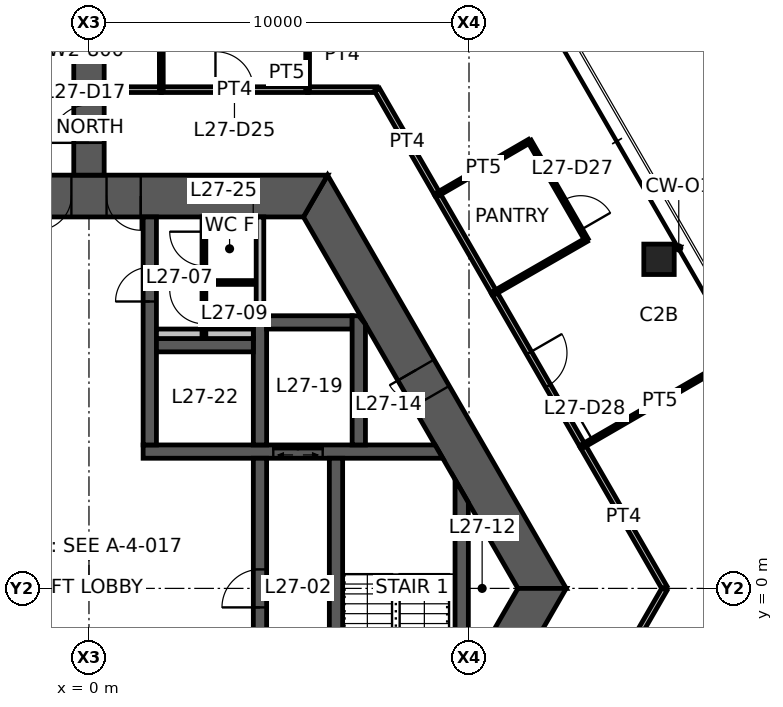
"""IFC4 building model, lengths in metres.
Left out: names, types, materials, properties, quantities, classifications, styles, units other than length and angle.
Written with IfcOpenShell. Run it as: python <this file> out.ifc"""

import sys

from ifc_helpers import new_model, si_unit, direction, frame, frame_2d, origin, origin_2d, place, context, subcontext, project, spatial, polyline, rectangle, hollow_rectangle, outline, extrude, element, fill, save


model = new_model("IFC4")
c1 = context("Model", 3, precision=1e-05, world=origin(), true_north=direction((0.0, 1.0)))
c2 = subcontext(c1, "Body", "Model", "MODEL_VIEW")
j1 = project(units=[si_unit("LENGTHUNIT", "METRE"), si_unit("PLANEANGLEUNIT", "RADIAN")], contexts=[c1])
p1 = place(None, origin())
s1 = spatial("IfcSite", under=j1, at=p1, CompositionType="ELEMENT")
p2 = place(p1, origin())
s2 = spatial("IfcBuilding", under=s1, at=p2, CompositionType="ELEMENT")
p3 = place(p2, frame((0.0, 0.0, 108.0)))
s3 = spatial("IfcBuildingStorey", under=s2, at=p3, CompositionType="ELEMENT", Elevation=108.0)
p4 = place(p3, frame((15.0, 8.66, 0.0), z_axis=(0.0, 0.0, 1.0), x_axis=(1.0, 0.0, 0.0)))
e1 = element("IfcColumn", 1, at=p4, inside=s3, PredefinedType="COLUMN", context=c2, shape_type="SweptSolid", body=[
    extrude(hollow_rectangle(XDim=0.8, YDim=0.8, WallThickness=0.045, at=origin_2d()), origin(), (0.0, 0.0, 1.0), 3.9),
])
p5 = place(p3, frame((11.922, 0.0, 0.0), z_axis=(0.0, 0.0, 1.0), x_axis=(-0.500004296715, 0.866022923061, 0.0)))
e2 = element("IfcWall", 2, at=p5, inside=s3, PredefinedType="SHEAR", context=c2, shape_type="SweptSolid", body=[
    extrude(outline(polyline([(-0.318, -0.55), (5.835, -0.55), (6.635, -0.55), (12.24, -0.55), (11.605, 0.55), (6.635, 0.55), (5.835, 0.55), (0.318, 0.55), (-0.318, -0.55)])), origin(), (0.0, 0.0, 1.0), 3.9),
])
p6 = place(p5, frame((5.835, 0.0, 0.0)))
e3 = element("IfcOpeningElement", 3, at=p6, cuts=e2, PredefinedType="OPENING", context=c2, shape_type="SweptSolid", body=[
    extrude(rectangle(XDim=0.8, YDim=2.1, at=frame_2d((0.4, 1.05))), frame((0.0, 0.56, 0.0), z_axis=(0.0, -1.0, 0.0), x_axis=(1.0, 0.0, 0.0)), (0.0, 0.0, 1.0), 1.12),
])
p7 = place(p3, frame((5.961, 10.325, 0.0), z_axis=(0.0, 0.0, 1.0), x_axis=(-1.0, 0.0, 0.0)))
e4 = element("IfcWall", 4, at=p7, inside=s3, PredefinedType="SHEAR", context=c2, shape_type="SweptSolid", body=[
    extrude(outline(polyline([(-0.318, -0.55), (4.599, -0.55), (5.499, -0.55), (6.424, -0.55), (7.323, -0.55), (12.24, -0.55), (11.605, 0.55), (7.323, 0.55), (6.424, 0.55), (5.499, 0.55), (4.599, 0.55), (0.318, 0.55), (-0.318, -0.55)])), origin(), (0.0, 0.0, 1.0), 3.9),
])
p8 = place(p7, frame((6.424, 0.0, 0.0)))
e5 = element("IfcOpeningElement", 5, at=p8, cuts=e4, PredefinedType="OPENING", context=c2, shape_type="SweptSolid", body=[
    extrude(rectangle(XDim=0.9, YDim=2.1, at=frame_2d((0.45, 1.05))), frame((0.0, 0.56, 0.0), z_axis=(0.0, -1.0, 0.0), x_axis=(1.0, 0.0, 0.0)), (0.0, 0.0, 1.0), 1.12),
])
p9 = place(p7, frame((4.599, 0.0, 0.0)))
e6 = element("IfcOpeningElement", 6, at=p9, cuts=e4, PredefinedType="OPENING", context=c2, shape_type="SweptSolid", body=[
    extrude(rectangle(XDim=0.9, YDim=2.1, at=frame_2d((0.45, 1.05))), frame((0.0, 0.56, 0.0), z_axis=(0.0, -1.0, 0.0), x_axis=(1.0, 0.0, 0.0)), (0.0, 0.0, 1.0), 1.12),
])
p10 = place(p3, frame((5.961, -10.325, 0.0), z_axis=(0.0, 0.0, 1.0), x_axis=(0.500004296715, 0.866022923061, 0.0)))
e7 = element("IfcWall", 7, at=p10, inside=s3, PredefinedType="SHEAR", context=c2, shape_type="SweptSolid", body=[
    extrude(outline(polyline([(-0.318, -0.55), (4.594, -0.55), (5.394, -0.55), (12.24, -0.55), (11.605, 0.55), (5.394, 0.55), (4.594, 0.55), (0.318, 0.55), (-0.318, -0.55)])), origin(), (0.0, 0.0, 1.0), 3.9),
])
p11 = place(p10, frame((4.594, 0.0, 0.0)))
e8 = element("IfcOpeningElement", 8, at=p11, cuts=e7, PredefinedType="OPENING", context=c2, shape_type="SweptSolid", body=[
    extrude(rectangle(XDim=0.8, YDim=2.1, at=frame_2d((0.4, 1.05))), frame((0.0, 0.56, 0.0), z_axis=(0.0, -1.0, 0.0), x_axis=(1.0, 0.0, 0.0)), (0.0, 0.0, 1.0), 1.12),
])
p12 = place(p3, frame((0.0, 10.875, 0.0), z_axis=(0.0, 0.0, 1.0), x_axis=(0.0, 1.0, 0.0)))
e9 = element("IfcWall", 9, at=p12, inside=s3, PredefinedType="SHEAR", context=c2, shape_type="SweptSolid", body=[
    extrude(rectangle(XDim=7.646, YDim=0.8, at=frame_2d((3.823, 0.0))), origin(), (0.0, 0.0, 1.0), 3.9),
])
p13 = place(p12, frame((0.85, 0.0, 0.0)))
e10 = element("IfcOpeningElement", 10, at=p13, cuts=e9, PredefinedType="OPENING", context=c2, shape_type="SweptSolid", body=[
    extrude(rectangle(XDim=1.0, YDim=2.1, at=frame_2d((0.5, 1.05))), frame((0.0, 0.41, 0.0), z_axis=(0.0, -1.0, 0.0), x_axis=(1.0, 0.0, 0.0)), (0.0, 0.0, 1.0), 0.82),
])
p14 = place(p3, frame((1.425, 3.6, 0.0), z_axis=(0.0, 0.0, 1.0), x_axis=(1.0, 0.0, 0.0)))
e11 = element("IfcWall", 11, at=p14, inside=s3, PredefinedType="SHEAR", context=c2, shape_type="SweptSolid", body=[
    extrude(outline(polyline([(0.0, -0.175), (3.425, -0.175), (4.725, -0.175), (7.885, -0.175), (7.683, 0.175), (4.725, 0.175), (3.425, 0.175), (0.0, 0.175), (0.0, -0.175)])), origin(), (0.0, 0.0, 1.0), 3.9),
])
p15 = place(p14, frame((3.425, 0.0, 0.0)))
e12 = element("IfcOpeningElement", 12, at=p15, cuts=e11, PredefinedType="OPENING", context=c2, shape_type="SweptSolid", body=[
    extrude(rectangle(XDim=1.3, YDim=2.1, at=frame_2d((0.65, 1.05))), frame((0.0, 0.185, 0.0), z_axis=(0.0, -1.0, 0.0), x_axis=(1.0, 0.0, 0.0)), (0.0, 0.0, 1.0), 0.37),
])
p16 = place(p3, frame((1.6, 3.775, 0.0), z_axis=(0.0, 0.0, 1.0), x_axis=(0.0, 1.0, 0.0)))
e13 = element("IfcWall", 13, at=p16, inside=s3, PredefinedType="SHEAR", context=c2, shape_type="SweptSolid", body=[
    extrude(rectangle(XDim=6.0, YDim=0.35, at=frame_2d((3.0, 0.0))), origin(), (0.0, 0.0, 1.0), 3.9),
])
p17 = place(p16, frame((3.775, 0.0, 0.0)))
e14 = element("IfcOpeningElement", 14, at=p17, cuts=e13, PredefinedType="OPENING", context=c2, shape_type="SweptSolid", body=[
    extrude(rectangle(XDim=0.9, YDim=2.1, at=frame_2d((0.45, 1.05))), frame((0.0, 0.185, 0.0), z_axis=(0.0, -1.0, 0.0), x_axis=(1.0, 0.0, 0.0)), (0.0, 0.0, 1.0), 0.37),
])
p18 = place(p3, frame((4.5, -3.425, 0.0), z_axis=(0.0, 0.0, 1.0), x_axis=(0.0, 1.0, 0.0)))
e15 = element("IfcWall", 15, at=p18, inside=s3, PredefinedType="SHEAR", context=c2, shape_type="SweptSolid", body=[
    extrude(rectangle(XDim=6.85, YDim=0.35, at=frame_2d((3.425, 0.0))), origin(), (0.0, 0.0, 1.0), 3.9),
])
p19 = place(p18, frame((2.925, 0.0, 0.0)))
e16 = element("IfcOpeningElement", 16, at=p19, cuts=e15, PredefinedType="OPENING", context=c2, shape_type="SweptSolid", body=[
    extrude(rectangle(XDim=1.0, YDim=2.1, at=frame_2d((0.5, 1.05))), frame((0.0, 0.185, 0.0), z_axis=(0.0, -1.0, 0.0), x_axis=(1.0, 0.0, 0.0)), (0.0, 0.0, 1.0), 0.37),
])
p20 = place(p3, frame((6.5, -3.425, 0.0), z_axis=(0.0, 0.0, 1.0), x_axis=(0.0, 1.0, 0.0)))
e17 = element("IfcWall", 17, at=p20, inside=s3, PredefinedType="SHEAR", context=c2, shape_type="SweptSolid", body=[
    extrude(rectangle(XDim=6.85, YDim=0.35, at=frame_2d((3.425, 0.0))), origin(), (0.0, 0.0, 1.0), 3.9),
])
p21 = place(p20, frame((0.1, 0.0, 0.0)))
e18 = element("IfcOpeningElement", 18, at=p21, cuts=e17, PredefinedType="OPENING", context=c2, shape_type="SweptSolid", body=[
    extrude(rectangle(XDim=1.0, YDim=2.1, at=frame_2d((0.5, 1.05))), frame((0.0, 0.185, 0.0), z_axis=(0.0, -1.0, 0.0), x_axis=(1.0, 0.0, 0.0)), (0.0, 0.0, 1.0), 0.37),
])
p22 = place(p3, frame((4.5, 3.775, 0.0), z_axis=(0.0, 0.0, 1.0), x_axis=(0.0, 1.0, 0.0)))
e19 = element("IfcWall", 19, at=p22, inside=s3, PredefinedType="SHEAR", context=c2, shape_type="SweptSolid", body=[
    extrude(rectangle(XDim=3.4, YDim=0.35, at=frame_2d((1.7, 0.0))), origin(), (0.0, 0.0, 1.0), 3.9),
])
p23 = place(p3, frame((1.775, 6.4, 0.0), z_axis=(0.0, 0.0, 1.0), x_axis=(1.0, 0.0, 0.0)))
e20 = element("IfcWall", 20, at=p23, inside=s3, PredefinedType="SHEAR", context=c2, shape_type="SweptSolid", body=[
    extrude(rectangle(XDim=2.55, YDim=0.35, at=frame_2d((1.275, 0.0))), origin(), (0.0, 0.0, 1.0), 3.9),
])
p24 = place(p3, frame((4.675, 7.0, 0.0), z_axis=(0.0, 0.0, 1.0), x_axis=(1.0, 0.0, 0.0)))
e21 = element("IfcWall", 21, at=p24, inside=s3, PredefinedType="SHEAR", context=c2, shape_type="SweptSolid", body=[
    extrude(rectangle(XDim=2.25, YDim=0.35, at=frame_2d((1.125, 0.0))), origin(), (0.0, 0.0, 1.0), 3.9),
])
p25 = place(p3, frame((7.1, 3.775, 0.0), z_axis=(0.0, 0.0, 1.0), x_axis=(0.0, 1.0, 0.0)))
e22 = element("IfcWall", 22, at=p25, inside=s3, PredefinedType="SHEAR", context=c2, shape_type="SweptSolid", body=[
    extrude(outline(polyline([(0.0, -0.175), (3.175, -0.175), (3.4, 0.0), (3.4, 0.175), (0.0, 0.175), (0.0, -0.175)])), origin(), (0.0, 0.0, 1.0), 3.9),
])
p26 = place(p3, frame((9.808, -2.562, 0.0), z_axis=(0.0, 0.0, 1.0), x_axis=(0.0, 1.0, 0.0)))
e23 = element("IfcWall", 23, at=p26, inside=s3, PredefinedType="SHEAR", context=c2, shape_type="SweptSolid", body=[
    extrude(outline(polyline([(0.303, -0.175), (4.821, -0.175), (5.428, 0.175), (-0.303, 0.175), (0.303, -0.175)])), origin(), (0.0, 0.0, 1.0), 3.9),
])
p27 = place(p3, frame((4.5, 7.175, 0.0), z_axis=(0.0, 0.0, 1.0), x_axis=(0.0, 1.0, 0.0)))
e24 = element("IfcWall", 24, at=p27, inside=s3, PredefinedType="STANDARD", context=c2, shape_type="SweptSolid", body=[
    extrude(rectangle(XDim=2.6, YDim=0.2, at=frame_2d((1.3, 0.0))), origin(), (0.0, 0.0, 1.0), 3.9),
])
p28 = place(p3, frame((1.775, 6.7, 0.0), z_axis=(0.0, 0.0, 1.0), x_axis=(1.0, 0.0, 0.0)))
e25 = element("IfcWall", 25, at=p28, inside=s3, PredefinedType="PLUMBINGWALL", context=c2, shape_type="SweptSolid", body=[
    extrude(rectangle(XDim=2.55, YDim=0.25, at=frame_2d((1.275, 0.0))), origin(), (0.0, 0.0, 1.0), 3.9),
])
p29 = place(p3, frame((3.025, 6.575, 0.0), z_axis=(0.0, 0.0, 1.0), x_axis=(0.0, 1.0, 0.0)))
e26 = element("IfcWall", 26, at=p29, inside=s3, PredefinedType="PARTITIONING", context=c2, shape_type="SweptSolid", body=[
    extrude(rectangle(XDim=3.2, YDim=0.1, at=frame_2d((1.6, 0.0))), origin(), (0.0, 0.0, 1.0), 2.95),
])
p30 = place(p29, frame((1.913, 0.0, 0.0)))
e27 = element("IfcOpeningElement", 27, at=p30, cuts=e26, PredefinedType="OPENING", context=c2, shape_type="SweptSolid", body=[
    extrude(rectangle(XDim=0.9, YDim=2.1, at=frame_2d((0.45, 1.05))), frame((0.0, 0.06, 0.0), z_axis=(0.0, -1.0, 0.0), x_axis=(1.0, 0.0, 0.0)), (0.0, 0.0, 1.0), 0.12),
])
p31 = place(p29, frame((0.387, 0.0, 0.0)))
e28 = element("IfcOpeningElement", 28, at=p31, cuts=e26, PredefinedType="OPENING", context=c2, shape_type="SweptSolid", body=[
    extrude(rectangle(XDim=0.9, YDim=2.1, at=frame_2d((0.45, 1.05))), frame((0.0, 0.06, 0.0), z_axis=(0.0, -1.0, 0.0), x_axis=(1.0, 0.0, 0.0)), (0.0, 0.0, 1.0), 0.12),
])
p32 = place(p3, frame((3.075, 8.05, 0.0), z_axis=(0.0, 0.0, 1.0), x_axis=(1.0, 0.0, 0.0)))
e29 = element("IfcWall", 29, at=p32, inside=s3, PredefinedType="PARTITIONING", context=c2, shape_type="SweptSolid", body=[
    extrude(rectangle(XDim=1.25, YDim=0.1, at=frame_2d((0.625, 0.0))), origin(), (0.0, 0.0, 1.0), 2.95),
])
p33 = place(p3, frame((1.895, 13.125, 0.0), z_axis=(0.0, 0.0, 1.0), x_axis=(1.0, 0.0, 0.0)))
e30 = element("IfcWall", 30, at=p33, inside=s3, PredefinedType="PARTITIONING", context=c2, shape_type="SweptSolid", body=[
    extrude(rectangle(XDim=3.867, YDim=0.15, at=frame_2d((1.934, 0.0))), origin(), (0.0, 0.0, 1.0), 2.95),
])
p34 = place(p33, frame((1.434, 0.0, 0.0)))
e31 = element("IfcOpeningElement", 31, at=p34, cuts=e30, PredefinedType="OPENING", context=c2, shape_type="SweptSolid", body=[
    extrude(rectangle(XDim=1.0, YDim=2.1, at=frame_2d((0.5, 1.05))), frame((0.0, 0.085, 0.0), z_axis=(0.0, -1.0, 0.0), x_axis=(1.0, 0.0, 0.0)), (0.0, 0.0, 1.0), 0.17),
])
p35 = place(p3, frame((9.164, 10.377, 0.0), z_axis=(0.0, 0.0, 1.0), x_axis=(0.500038395149, -0.8660032352, 0.0)))
e32 = element("IfcWall", 32, at=p35, inside=s3, PredefinedType="PARTITIONING", context=c2, shape_type="SweptSolid", body=[
    extrude(rectangle(XDim=3.01, YDim=0.15, at=frame_2d((1.505, 0.0))), origin(), (0.0, 0.0, 1.0), 2.95),
])
p36 = place(p3, frame((12.987, 3.755, 0.0), z_axis=(0.0, 0.0, 1.0), x_axis=(0.499980509014, -0.866036656618, 0.0)))
e33 = element("IfcWall", 33, at=p36, inside=s3, PredefinedType="PARTITIONING", context=c2, shape_type="SweptSolid", body=[
    extrude(rectangle(XDim=4.313, YDim=0.15, at=frame_2d((2.157, 0.0))), origin(), (0.0, 0.0, 1.0), 2.95),
])
p37 = place(p3, frame((0.42, 13.125, 0.0), z_axis=(0.0, 0.0, 1.0), x_axis=(1.0, 0.0, 0.0)))
e34 = element("IfcWall", 34, at=p37, inside=s3, PredefinedType="PARTITIONING", context=c2, shape_type="SweptSolid", body=[
    extrude(rectangle(XDim=1.485, YDim=0.15, at=frame_2d((0.742, 0.0))), origin(), (0.0, 0.0, 1.0), 2.95),
])
p38 = place(p3, frame((5.752, 13.125, 0.0), z_axis=(0.0, 0.0, 1.0), x_axis=(1.0, 0.0, 0.0)))
e35 = element("IfcWall", 35, at=p38, inside=s3, PredefinedType="PARTITIONING", context=c2, shape_type="SweptSolid", body=[
    extrude(rectangle(XDim=1.825, YDim=0.15, at=frame_2d((0.913, 0.0))), origin(), (0.0, 0.0, 1.0), 2.95),
])
p39 = place(p3, frame((7.578, 13.125, 0.0), z_axis=(0.0, 0.0, 1.0), x_axis=(0.499992528944, -0.866029717158, 0.0)))
e36 = element("IfcWall", 36, at=p39, inside=s3, PredefinedType="PARTITIONING", context=c2, shape_type="SweptSolid", body=[
    extrude(rectangle(XDim=3.182, YDim=0.15, at=frame_2d((1.591, 0.0))), origin(), (0.0, 0.0, 1.0), 2.95),
])
p40 = place(p3, frame((10.664, 7.779, 0.0), z_axis=(0.0, 0.0, 1.0), x_axis=(0.500008456887, -0.866020521143, 0.0)))
e37 = element("IfcWall", 37, at=p40, inside=s3, PredefinedType="PARTITIONING", context=c2, shape_type="SweptSolid", body=[
    extrude(rectangle(XDim=4.655, YDim=0.15, at=frame_2d((2.328, 0.0))), origin(), (0.0, 0.0, 1.0), 2.95),
])
p41 = place(p40, frame((1.828, 0.0, 0.0)))
e38 = element("IfcOpeningElement", 38, at=p41, cuts=e37, PredefinedType="OPENING", context=c2, shape_type="SweptSolid", body=[
    extrude(rectangle(XDim=1.0, YDim=2.1, at=frame_2d((0.5, 1.05))), frame((0.0, 0.085, 0.0), z_axis=(0.0, -1.0, 0.0), x_axis=(1.0, 0.0, 0.0)), (0.0, 0.0, 1.0), 0.17),
])
for number, where, z_axis, x_axis in (
    (39, (1.905, 13.125, 0.0), (0.0, 0.0, 1.0), (-0.002, 1.0, 0.0)),
    (40, (5.757, 15.925, 0.0), (0.0, 0.0, 1.0), (-0.002, -1.0, 0.0)),
    (41, (9.169, 10.369, 0.0), (0.0, 0.0, 1.0), (0.865, 0.501, 0.0)),
):
    element("IfcWall", number, at=place(p3, frame(where, z_axis=z_axis, x_axis=x_axis)), inside=s3, PredefinedType="PARTITIONING", context=c2, shape_type="SweptSolid", body=[
        extrude(rectangle(XDim=2.8, YDim=0.1, at=frame_2d((1.4, 0.0))), origin(), (0.0, 0.0, 1.0), 2.95),
    ])
p42 = place(p3, frame((11.592, 11.773, 0.0), z_axis=(0.0, 0.0, 1.0), x_axis=(0.499990139034, -0.866031096941, 0.0)))
e42 = element("IfcWall", 42, at=p42, inside=s3, PredefinedType="PARTITIONING", context=c2, shape_type="SweptSolid", body=[
    extrude(rectangle(XDim=3.0, YDim=0.1, at=frame_2d((1.5, 0.0))), origin(), (0.0, 0.0, 1.0), 2.95),
])
p43 = place(p42, frame((1.8, 0.0, 0.0)))
e43 = element("IfcOpeningElement", 43, at=p43, cuts=e42, PredefinedType="OPENING", context=c2, shape_type="SweptSolid", body=[
    extrude(rectangle(XDim=0.9, YDim=2.1, at=frame_2d((0.45, 1.05))), frame((0.0, 0.06, 0.0), z_axis=(0.0, -1.0, 0.0), x_axis=(1.0, 0.0, 0.0)), (0.0, 0.0, 1.0), 0.12),
])
p44 = place(p3, frame((13.092, 9.175, 0.0), z_axis=(0.0, 0.0, 1.0), x_axis=(-0.866855433567, -0.498559582492, 0.0)))
e44 = element("IfcWall", 44, at=p44, inside=s3, PredefinedType="PARTITIONING", context=c2, shape_type="SweptSolid", body=[
    extrude(rectangle(XDim=2.8, YDim=0.1, at=frame_2d((1.4, 0.0))), origin(), (0.0, 0.0, 1.0), 2.95),
])
p45 = place(p3, frame((12.992, 3.747, 0.0), z_axis=(0.0, 0.0, 1.0), x_axis=(0.865555596133, 0.500812849279, 0.0)))
e45 = element("IfcWall", 45, at=p45, inside=s3, PredefinedType="PARTITIONING", context=c2, shape_type="SweptSolid", body=[
    extrude(rectangle(XDim=4.696, YDim=0.1, at=frame_2d((2.348, 0.0))), origin(), (0.0, 0.0, 1.0), 2.95),
])
p46 = place(p45, frame((0.3, 0.0, 0.0)))
e46 = element("IfcOpeningElement", 46, at=p46, cuts=e45, PredefinedType="OPENING", context=c2, shape_type="SweptSolid", body=[
    extrude(rectangle(XDim=0.9, YDim=2.1, at=frame_2d((0.45, 1.05))), frame((0.0, 0.06, 0.0), z_axis=(0.0, -1.0, 0.0), x_axis=(1.0, 0.0, 0.0)), (0.0, 0.0, 1.0), 0.12),
])
p47 = place(p3, frame((-1.905, 13.125, 0.0), z_axis=(0.0, 0.0, 1.0), x_axis=(1.0, 0.0, 0.0)))
e47 = element("IfcWall", 47, at=p47, inside=s3, PredefinedType="PARTITIONING", context=c2, shape_type="SweptSolid", body=[
    extrude(rectangle(XDim=1.485, YDim=0.15, at=frame_2d((0.742, 0.0))), origin(), (0.0, 0.0, 1.0), 2.95),
])
p48 = place(p3, frame((15.144, -0.02, 0.0), z_axis=(0.0, 0.0, 1.0), x_axis=(-0.499985098601, -0.86603400694, 0.0)))
e48 = element("IfcWall", 48, at=p48, inside=s3, PredefinedType="PARTITIONING", context=c2, shape_type="SweptSolid", body=[
    extrude(rectangle(XDim=7.135, YDim=0.15, at=frame_2d((3.567, 0.0))), origin(), (0.0, 0.0, 1.0), 2.95),
])
p49 = place(p48, frame((3.067, 0.0, 0.0)))
e49 = element("IfcOpeningElement", 49, at=p49, cuts=e48, PredefinedType="OPENING", context=c2, shape_type="SweptSolid", body=[
    extrude(rectangle(XDim=1.0, YDim=2.1, at=frame_2d((0.5, 1.05))), frame((0.0, 0.085, 0.0), z_axis=(0.0, -1.0, 0.0), x_axis=(1.0, 0.0, 0.0)), (0.0, 0.0, 1.0), 0.17),
])
p50 = place(p8, origin())
e50 = element("IfcDoor", 50, at=p50, inside=s3, OperationType="SINGLE_SWING_RIGHT", PredefinedType="DOOR", context=c2, shape_type="SweptSolid", body=[
    extrude(rectangle(XDim=0.9, YDim=2.1, at=frame_2d((0.45, 1.05))), frame((0.0, 0.025, 0.0), z_axis=(0.0, -1.0, 0.0), x_axis=(1.0, 0.0, 0.0)), (0.0, 0.0, 1.0), 0.05),
])
fill(e5, e50)
p51 = place(p9, origin())
e51 = element("IfcDoor", 51, at=p51, inside=s3, OperationType="SINGLE_SWING_LEFT", PredefinedType="DOOR", context=c2, shape_type="SweptSolid", body=[
    extrude(rectangle(XDim=0.9, YDim=2.1, at=frame_2d((0.45, 1.05))), frame((0.0, 0.025, 0.0), z_axis=(0.0, -1.0, 0.0), x_axis=(1.0, 0.0, 0.0)), (0.0, 0.0, 1.0), 0.05),
])
fill(e6, e51)
p52 = place(p6, origin())
e52 = element("IfcDoor", 52, at=p52, inside=s3, OperationType="SINGLE_SWING_RIGHT", PredefinedType="DOOR", context=c2, shape_type="SweptSolid", body=[
    extrude(rectangle(XDim=0.8, YDim=2.1, at=frame_2d((0.4, 1.05))), frame((0.0, 0.025, 0.0), z_axis=(0.0, -1.0, 0.0), x_axis=(1.0, 0.0, 0.0)), (0.0, 0.0, 1.0), 0.05),
])
fill(e3, e52)
p53 = place(p19, origin())
e53 = element("IfcDoor", 53, at=p53, inside=s3, OperationType="SINGLE_SWING_LEFT", PredefinedType="DOOR", context=c2, shape_type="SweptSolid", body=[
    extrude(rectangle(XDim=1.0, YDim=2.1, at=frame_2d((0.5, 1.05))), frame((0.0, 0.025, 0.0), z_axis=(0.0, -1.0, 0.0), x_axis=(1.0, 0.0, 0.0)), (0.0, 0.0, 1.0), 0.05),
])
fill(e16, e53)
p54 = place(p17, origin())
e54 = element("IfcDoor", 54, at=p54, inside=s3, OperationType="SINGLE_SWING_LEFT", PredefinedType="DOOR", context=c2, shape_type="SweptSolid", body=[
    extrude(rectangle(XDim=0.9, YDim=2.1, at=frame_2d((0.45, 1.05))), frame((0.0, 0.025, 0.0), z_axis=(0.0, -1.0, 0.0), x_axis=(1.0, 0.0, 0.0)), (0.0, 0.0, 1.0), 0.05),
])
fill(e14, e54)
p55 = place(p13, origin())
e55 = element("IfcDoor", 55, at=p55, inside=s3, OperationType="SINGLE_SWING_LEFT", PredefinedType="DOOR", context=c2, shape_type="SweptSolid", body=[
    extrude(rectangle(XDim=1.0, YDim=2.1, at=frame_2d((0.5, 1.05))), frame((0.0, 0.025, 0.0), z_axis=(0.0, -1.0, 0.0), x_axis=(1.0, 0.0, 0.0)), (0.0, 0.0, 1.0), 0.05),
])
fill(e10, e55)
p56 = place(p30, origin())
e56 = element("IfcDoor", 56, at=p56, inside=s3, OperationType="SINGLE_SWING_RIGHT", PredefinedType="DOOR", context=c2, shape_type="SweptSolid", body=[
    extrude(rectangle(XDim=0.9, YDim=2.1, at=frame_2d((0.45, 1.05))), frame((0.0, 0.025, 0.0), z_axis=(0.0, -1.0, 0.0), x_axis=(1.0, 0.0, 0.0)), (0.0, 0.0, 1.0), 0.05),
])
fill(e27, e56)
p57 = place(p31, origin())
e57 = element("IfcDoor", 57, at=p57, inside=s3, OperationType="SINGLE_SWING_RIGHT", PredefinedType="DOOR", context=c2, shape_type="SweptSolid", body=[
    extrude(rectangle(XDim=0.9, YDim=2.1, at=frame_2d((0.45, 1.05))), frame((0.0, 0.025, 0.0), z_axis=(0.0, -1.0, 0.0), x_axis=(1.0, 0.0, 0.0)), (0.0, 0.0, 1.0), 0.05),
])
fill(e28, e57)
p58 = place(p34, origin())
e58 = element("IfcDoor", 58, at=p58, inside=s3, OperationType="SINGLE_SWING_LEFT", PredefinedType="DOOR", context=c2, shape_type="SweptSolid", body=[
    extrude(rectangle(XDim=1.0, YDim=2.1, at=frame_2d((0.5, 1.05))), frame((0.0, 0.025, 0.0), z_axis=(0.0, -1.0, 0.0), x_axis=(1.0, 0.0, 0.0)), (0.0, 0.0, 1.0), 0.05),
])
fill(e31, e58)
p59 = place(p41, origin())
e59 = element("IfcDoor", 59, at=p59, inside=s3, OperationType="SINGLE_SWING_LEFT", PredefinedType="DOOR", context=c2, shape_type="SweptSolid", body=[
    extrude(rectangle(XDim=1.0, YDim=2.1, at=frame_2d((0.5, 1.05))), frame((0.0, 0.025, 0.0), z_axis=(0.0, -1.0, 0.0), x_axis=(1.0, 0.0, 0.0)), (0.0, 0.0, 1.0), 0.05),
])
fill(e38, e59)
p60 = place(p43, origin())
e60 = element("IfcDoor", 60, at=p60, inside=s3, OperationType="SINGLE_SWING_RIGHT", PredefinedType="DOOR", context=c2, shape_type="SweptSolid", body=[
    extrude(rectangle(XDim=0.9, YDim=2.1, at=frame_2d((0.45, 1.05))), frame((0.0, 0.025, 0.0), z_axis=(0.0, -1.0, 0.0), x_axis=(1.0, 0.0, 0.0)), (0.0, 0.0, 1.0), 0.05),
])
fill(e43, e60)
p61 = place(p46, origin())
e61 = element("IfcDoor", 61, at=p61, inside=s3, OperationType="SINGLE_SWING_LEFT", PredefinedType="DOOR", context=c2, shape_type="SweptSolid", body=[
    extrude(rectangle(XDim=0.9, YDim=2.1, at=frame_2d((0.45, 1.05))), frame((0.0, 0.025, 0.0), z_axis=(0.0, -1.0, 0.0), x_axis=(1.0, 0.0, 0.0)), (0.0, 0.0, 1.0), 0.05),
])
fill(e46, e61)
p62 = place(p15, origin())
e62 = element("IfcDoor", 62, at=p62, inside=s3, OperationType="DOUBLE_DOOR_SLIDING", PredefinedType="DOOR", context=c2, shape_type="SweptSolid", body=[
    extrude(rectangle(XDim=1.3, YDim=2.1, at=frame_2d((0.65, 1.05))), frame((0.0, 0.025, 0.0), z_axis=(0.0, -1.0, 0.0), x_axis=(1.0, 0.0, 0.0)), (0.0, 0.0, 1.0), 0.05),
])
fill(e12, e62)
save(model, sys.argv[1])
